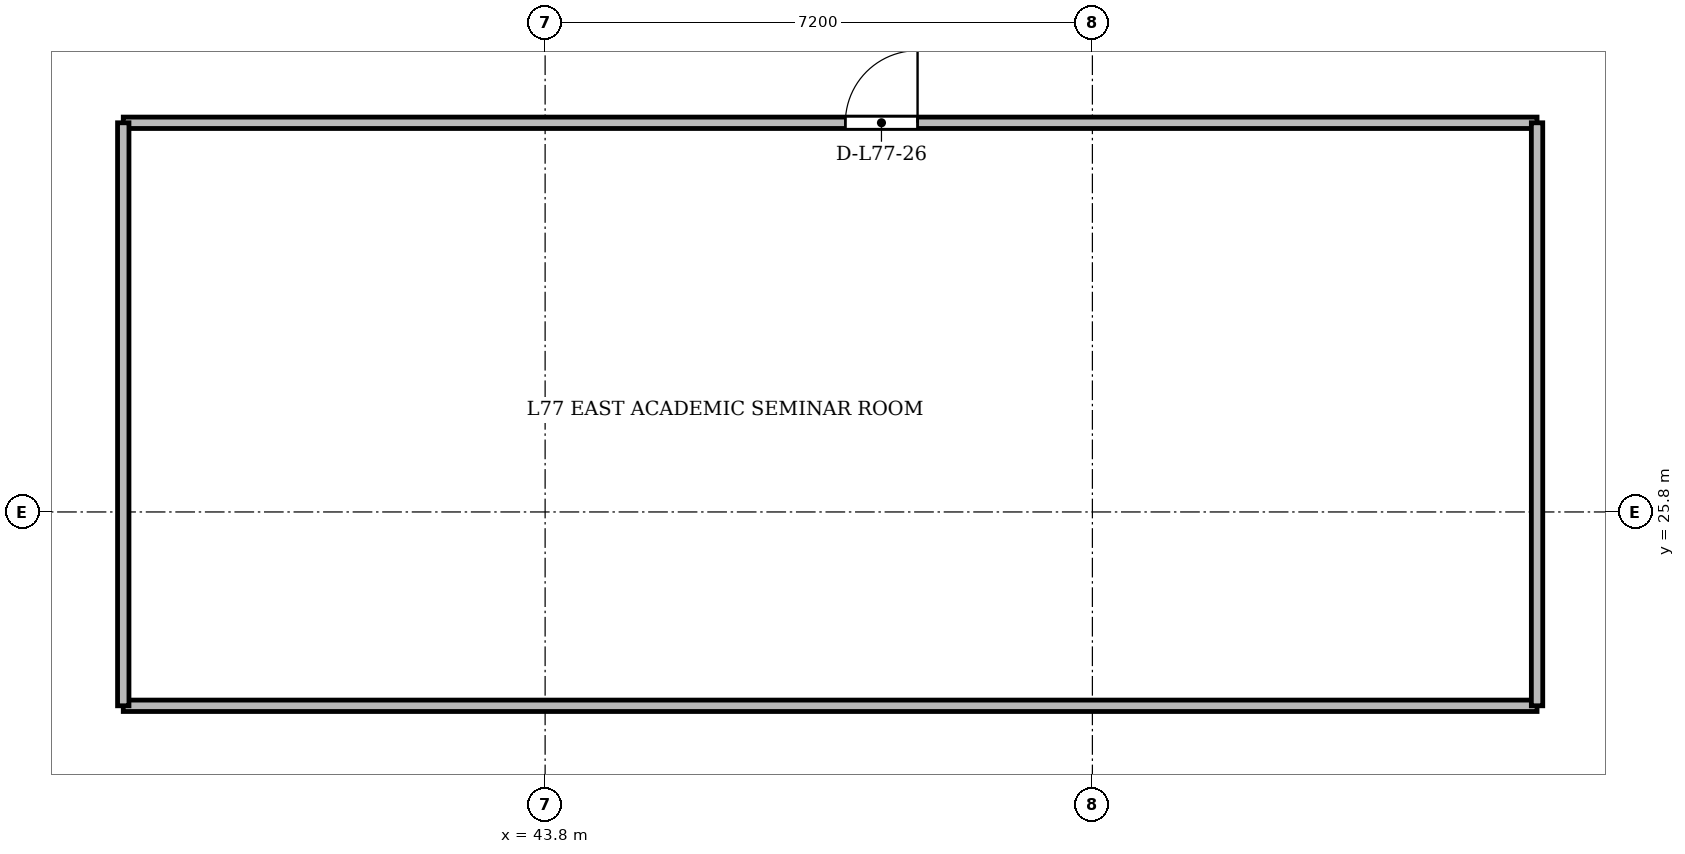
"""IFC4 building model, lengths in metres.
Left out: names, types, materials, properties, quantities, classifications, styles, units other than length and angle.
Written with IfcOpenShell. Run it as: python <this file> out.ifc"""

import sys

from ifc_helpers import new_model, si_unit, direction, frame, frame_2d, origin, place, context, subcontext, project, spatial, rectangle, extrude, source, transform, mapped, element, fill, save


model = new_model("IFC4")
c1 = context("Model", 3, precision=1e-05, world=origin(), true_north=direction((0.0, 1.0)))
c2 = subcontext(c1, "Body", "Model", "MODEL_VIEW")
j1 = project(units=[si_unit("LENGTHUNIT", "METRE"), si_unit("PLANEANGLEUNIT", "RADIAN")], contexts=[c1])
p1 = place(None, origin())
s1 = spatial("IfcSite", under=j1, at=p1, CompositionType="ELEMENT")
p2 = place(p1, origin())
s2 = spatial("IfcBuilding", under=s1, at=p2, CompositionType="ELEMENT")
p3 = place(p2, frame((0.0, 0.0, 295.5)))
s3 = spatial("IfcBuildingStorey", under=s2, at=p3, CompositionType="ELEMENT", Elevation=295.5)
p4 = place(p3, frame((38.25, 30.92, 0.0), z_axis=(0.0, 0.0, 1.0), x_axis=(1.0, 0.0, 0.0)))
e1 = element("IfcWall", 1, at=p4, inside=s3, PredefinedType="PARTITIONING", context=c2, shape_type="SweptSolid", body=[
    extrude(rectangle(XDim=18.6, YDim=0.15, at=frame_2d((9.3, 0.0))), origin(), (0.0, 0.0, 1.0), 2.76),
])
p5 = place(p4, frame((9.5, 0.0, 0.0)))
e2 = element("IfcOpeningElement", 2, at=p5, cuts=e1, PredefinedType="OPENING", context=c2, shape_type="SweptSolid", body=[
    extrude(rectangle(XDim=0.95, YDim=2.15, at=frame_2d((0.475, 1.075))), frame((0.0, 0.085, 0.0), z_axis=(0.0, -1.0, 0.0), x_axis=(1.0, 0.0, 0.0)), (0.0, 0.0, 1.0), 0.17),
])
p6 = place(p3, frame((38.25, 23.25, 0.0), z_axis=(0.0, 0.0, 1.0), x_axis=(1.0, 0.0, 0.0)))
e3 = element("IfcWall", 3, at=p6, inside=s3, PredefinedType="PARTITIONING", context=c2, shape_type="SweptSolid", body=[
    extrude(rectangle(XDim=18.6, YDim=0.15, at=frame_2d((9.3, 0.0))), origin(), (0.0, 0.0, 1.0), 2.76),
])
for number, where, z_axis, x_axis in (
    (4, (38.25, 23.25, 0.0), (0.0, 0.0, 1.0), (0.0, 1.0, 0.0)),
    (5, (56.85, 23.25, 0.0), (0.0, 0.0, 1.0), (0.0, 1.0, 0.0)),
):
    element("IfcWall", number, at=place(p3, frame(where, z_axis=z_axis, x_axis=x_axis)), inside=s3, PredefinedType="PARTITIONING", context=c2, shape_type="SweptSolid", body=[
        extrude(rectangle(XDim=7.67, YDim=0.15, at=frame_2d((3.835, 0.0))), origin(), (0.0, 0.0, 1.0), 2.96),
    ])
m1 = source(origin(), c2, "Body", "SweptSolid", [
    extrude(rectangle(XDim=0.95, YDim=2.15, at=frame_2d((0.475, 1.075))), frame((0.0, 0.025, 0.0), z_axis=(0.0, -1.0, 0.0), x_axis=(1.0, 0.0, 0.0)), (0.0, 0.0, 1.0), 0.05),
])
p7 = place(p5, origin())
e6 = element("IfcDoor", 6, at=p7, inside=s3, OperationType="SINGLE_SWING_RIGHT", PredefinedType="DOOR", context=c2, shape_type="MappedRepresentation", body=[
    mapped(m1, transform((0.0, 0.0, 0.0), x_axis=(1.0, 0.0, 0.0), y_axis=(0.0, 1.0, 0.0), z_axis=(0.0, 0.0, 1.0), scale=1.0)),
])
fill(e2, e6)
save(model, sys.argv[1])
